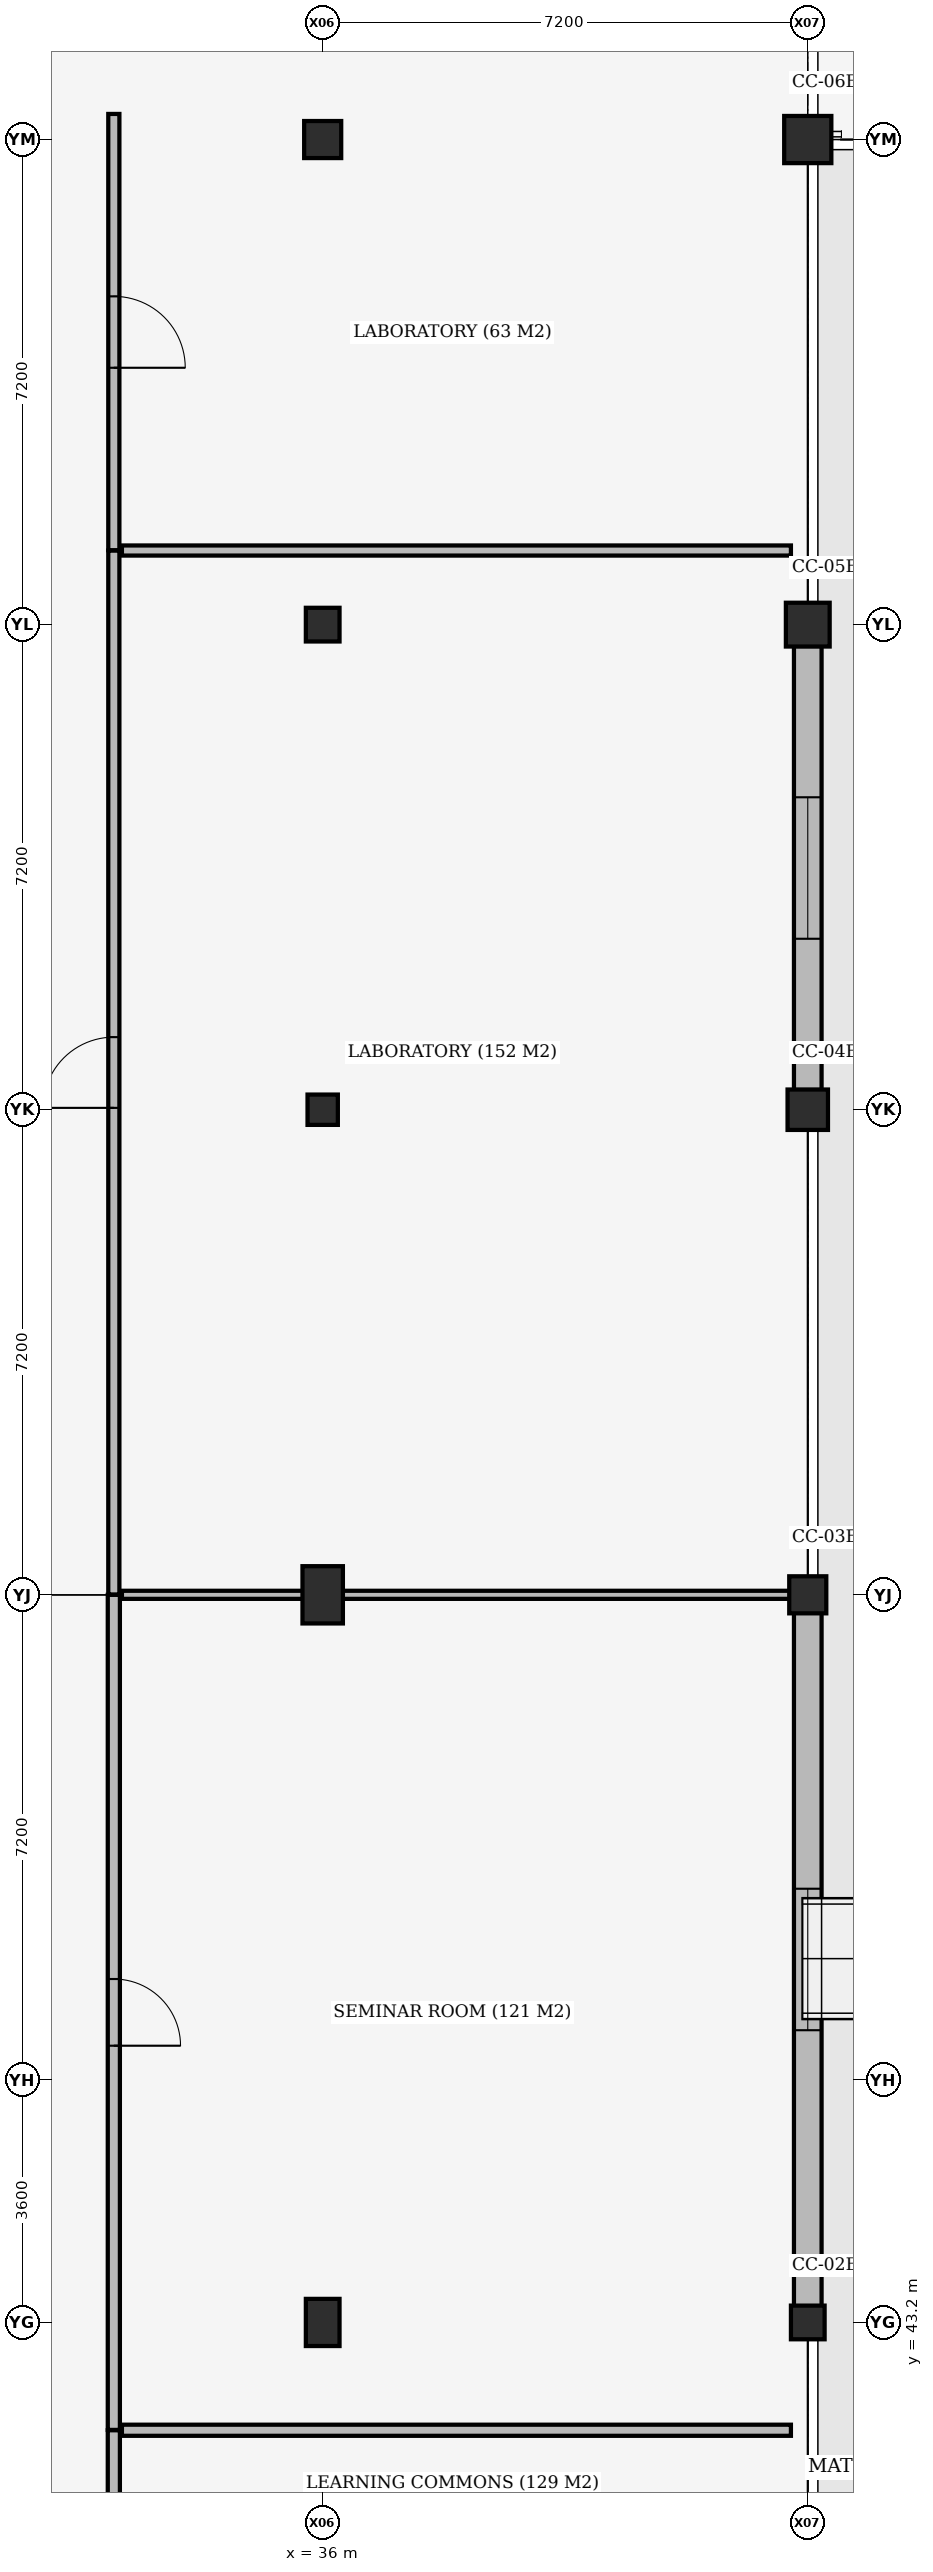
"""IFC4 building model, lengths in metres.
Left out: names, types, materials, properties, quantities, classifications, styles, units other than length and angle.
Written with IfcOpenShell. Run it as: python <this file> out.ifc"""

import sys

from ifc_helpers import new_model, si_unit, direction, frame, frame_2d, origin, origin_2d, place, context, subcontext, project, spatial, rectangle, extrude, element, fill, save


model = new_model("IFC4")
c1 = context("Model", 3, precision=1e-05, world=origin(), true_north=direction((0.0, 1.0)))
c2 = subcontext(c1, "Body", "Model", "MODEL_VIEW")
j1 = project(units=[si_unit("LENGTHUNIT", "METRE"), si_unit("PLANEANGLEUNIT", "RADIAN")], contexts=[c1])
p1 = place(None, origin())
s1 = spatial("IfcSite", under=j1, at=p1, CompositionType="ELEMENT")
p2 = place(p1, origin())
s2 = spatial("IfcBuilding", under=s1, at=p2, CompositionType="ELEMENT")
p3 = place(p2, origin())
s3 = spatial("IfcBuildingStorey", under=s2, at=p3, CompositionType="ELEMENT", Elevation=0.0)
p4 = place(p3, frame((36.0, 43.2, 0.0), z_axis=(0.0, 0.0, 1.0), x_axis=(1.0, 0.0, 0.0)))
e1 = element("IfcColumn", 1, at=p4, inside=s3, PredefinedType="COLUMN", context=c2, shape_type="SweptSolid", body=[
    extrude(rectangle(XDim=0.5, YDim=0.7, at=origin_2d()), origin(), (0.0, 0.0, 1.0), 5.1),
])
p5 = place(p3, frame((36.0, 54.0, 0.0), z_axis=(0.0, 0.0, 1.0), x_axis=(1.0, 0.0, 0.0)))
e2 = element("IfcColumn", 2, at=p5, inside=s3, PredefinedType="COLUMN", context=c2, shape_type="SweptSolid", body=[
    extrude(rectangle(XDim=0.6, YDim=0.85, at=origin_2d()), origin(), (0.0, 0.0, 1.0), 5.1),
])
p6 = place(p3, frame((36.0, 61.2, 0.0), z_axis=(0.0, 0.0, 1.0), x_axis=(1.0, 0.0, 0.0)))
e3 = element("IfcColumn", 3, at=p6, inside=s3, PredefinedType="COLUMN", context=c2, shape_type="SweptSolid", body=[
    extrude(rectangle(XDim=0.45, YDim=0.45, at=origin_2d()), origin(), (0.0, 0.0, 1.0), 5.1),
])
p7 = place(p3, frame((36.0, 68.4, 0.0), z_axis=(0.0, 0.0, 1.0), x_axis=(1.0, 0.0, 0.0)))
e4 = element("IfcColumn", 4, at=p7, inside=s3, PredefinedType="COLUMN", context=c2, shape_type="SweptSolid", body=[
    extrude(rectangle(XDim=0.5, YDim=0.5, at=origin_2d()), origin(), (0.0, 0.0, 1.0), 5.1),
])
p8 = place(p3, frame((36.0, 75.6, 0.0), z_axis=(0.0, 0.0, 1.0), x_axis=(1.0, 0.0, 0.0)))
e5 = element("IfcColumn", 5, at=p8, inside=s3, PredefinedType="COLUMN", context=c2, shape_type="SweptSolid", body=[
    extrude(rectangle(XDim=0.55, YDim=0.55, at=origin_2d()), origin(), (0.0, 0.0, 1.0), 5.1),
])
p9 = place(p3, frame((43.2, 43.2, 0.0), z_axis=(0.0, 0.0, 1.0), x_axis=(1.0, 0.0, 0.0)))
e6 = element("IfcColumn", 6, at=p9, inside=s3, PredefinedType="COLUMN", context=c2, shape_type="SweptSolid", body=[
    extrude(rectangle(XDim=0.5, YDim=0.5, at=origin_2d()), origin(), (0.0, 0.0, 1.0), 5.1),
])
p10 = place(p3, frame((43.2, 54.0, 0.0), z_axis=(0.0, 0.0, 1.0), x_axis=(1.0, 0.0, 0.0)))
e7 = element("IfcColumn", 7, at=p10, inside=s3, PredefinedType="COLUMN", context=c2, shape_type="SweptSolid", body=[
    extrude(rectangle(XDim=0.55, YDim=0.55, at=origin_2d()), origin(), (0.0, 0.0, 1.0), 5.1),
])
p11 = place(p3, frame((43.2, 61.2, 0.0), z_axis=(0.0, 0.0, 1.0), x_axis=(1.0, 0.0, 0.0)))
e8 = element("IfcColumn", 8, at=p11, inside=s3, PredefinedType="COLUMN", context=c2, shape_type="SweptSolid", body=[
    extrude(rectangle(XDim=0.6, YDim=0.6, at=origin_2d()), origin(), (0.0, 0.0, 1.0), 5.1),
])
p12 = place(p3, frame((43.2, 68.4, 0.0), z_axis=(0.0, 0.0, 1.0), x_axis=(1.0, 0.0, 0.0)))
e9 = element("IfcColumn", 9, at=p12, inside=s3, PredefinedType="COLUMN", context=c2, shape_type="SweptSolid", body=[
    extrude(rectangle(XDim=0.65, YDim=0.65, at=origin_2d()), origin(), (0.0, 0.0, 1.0), 5.1),
])
p13 = place(p3, frame((43.2, 75.6, 0.0), z_axis=(0.0, 0.0, 1.0), x_axis=(1.0, 0.0, 0.0)))
e10 = element("IfcColumn", 10, at=p13, inside=s3, PredefinedType="COLUMN", context=c2, shape_type="SweptSolid", body=[
    extrude(rectangle(XDim=0.7, YDim=0.7, at=origin_2d()), origin(), (0.0, 0.0, 1.0), 5.1),
])
p14 = place(p3, frame((43.2, 53.733, 0.0), z_axis=(0.0, 0.0, 1.0), x_axis=(0.0, -1.0, 0.0)))
e11 = element("IfcWall", 11, at=p14, inside=s3, PredefinedType="STANDARD", context=c2, shape_type="SweptSolid", body=[
    extrude(rectangle(XDim=10.291, YDim=0.41, at=frame_2d((5.146, 0.0))), origin(), (0.0, 0.0, 1.0), 4.45),
])
p15 = place(p14, frame((4.095, 0.0, 0.8)))
e12 = element("IfcOpeningElement", 12, at=p15, cuts=e11, PredefinedType="OPENING", context=c2, shape_type="SweptSolid", body=[
    extrude(rectangle(XDim=2.1, YDim=3.0, at=frame_2d((1.05, 1.5))), frame((0.0, 0.215, 0.0), z_axis=(0.0, -1.0, 0.0), x_axis=(1.0, 0.0, 0.0)), (0.0, 0.0, 1.0), 0.43),
])
p16 = place(p3, frame((43.2, 68.083, 0.0), z_axis=(0.0, 0.0, 1.0), x_axis=(0.0, -1.0, 0.0)))
e13 = element("IfcWall", 13, at=p16, inside=s3, PredefinedType="STANDARD", context=c2, shape_type="SweptSolid", body=[
    extrude(rectangle(XDim=6.591, YDim=0.41, at=frame_2d((3.295, 0.0))), origin(), (0.0, 0.0, 1.0), 4.35),
])
p17 = place(p16, frame((2.246, 0.0, 0.8)))
e14 = element("IfcOpeningElement", 14, at=p17, cuts=e13, PredefinedType="OPENING", context=c2, shape_type="SweptSolid", body=[
    extrude(rectangle(XDim=2.1, YDim=3.0, at=frame_2d((1.05, 1.5))), frame((0.0, 0.215, 0.0), z_axis=(0.0, -1.0, 0.0), x_axis=(1.0, 0.0, 0.0)), (0.0, 0.0, 1.0), 0.43),
])
p18 = place(p3, frame((32.9, 28.42, 0.0), z_axis=(0.0, 0.0, 1.0), x_axis=(0.0, 1.0, 0.0)))
e15 = element("IfcWall", 15, at=p18, inside=s3, PredefinedType="PARTITIONING", context=c2, shape_type="SweptSolid", body=[
    extrude(rectangle(XDim=13.18, YDim=0.18, at=frame_2d((6.59, 0.0))), origin(), (0.0, 0.0, 1.0), 4.45),
])
p19 = place(p18, frame((6.1, 0.0, 0.0)))
e16 = element("IfcOpeningElement", 16, at=p19, cuts=e15, PredefinedType="OPENING", context=c2, shape_type="SweptSolid", body=[
    extrude(rectangle(XDim=0.98, YDim=2.18, at=frame_2d((0.49, 1.09))), frame((0.0, 0.1, 0.0), z_axis=(0.0, -1.0, 0.0), x_axis=(1.0, 0.0, 0.0)), (0.0, 0.0, 1.0), 0.2),
])
p20 = place(p3, frame((33.02, 41.6, 0.0), z_axis=(0.0, 0.0, 1.0), x_axis=(1.0, 0.0, 0.0)))
e17 = element("IfcWall", 17, at=p20, inside=s3, PredefinedType="PARTITIONING", context=c2, shape_type="SweptSolid", body=[
    extrude(rectangle(XDim=9.93, YDim=0.165, at=frame_2d((4.965, 0.0))), origin(), (0.0, 0.0, 1.0), 4.35),
])
p21 = place(p3, frame((32.9, 41.605, 0.0), z_axis=(0.0, 0.0, 1.0), x_axis=(0.0, 1.0, 0.0)))
e18 = element("IfcWall", 18, at=p21, inside=s3, PredefinedType="PARTITIONING", context=c2, shape_type="SweptSolid", body=[
    extrude(rectangle(XDim=12.395, YDim=0.18, at=frame_2d((6.198, 0.0))), origin(), (0.0, 0.0, 1.0), 4.3),
])
p22 = place(p21, frame((5.702, 0.0, 0.0)))
e19 = element("IfcOpeningElement", 19, at=p22, cuts=e18, PredefinedType="OPENING", context=c2, shape_type="SweptSolid", body=[
    extrude(rectangle(XDim=0.99, YDim=2.18, at=frame_2d((0.495, 1.09))), frame((0.0, 0.1, 0.0), z_axis=(0.0, -1.0, 0.0), x_axis=(1.0, 0.0, 0.0)), (0.0, 0.0, 1.0), 0.2),
])
p23 = place(p3, frame((33.02, 54.0, 0.0), z_axis=(0.0, 0.0, 1.0), x_axis=(1.0, 0.0, 0.0)))
e20 = element("IfcWall", 20, at=p23, inside=s3, PredefinedType="PARTITIONING", context=c2, shape_type="SweptSolid", body=[
    extrude(rectangle(XDim=9.93, YDim=0.12, at=frame_2d((4.965, 0.0))), origin(), (0.0, 0.0, 1.0), 4.3),
])
p24 = place(p3, frame((32.9, 54.005, 0.0), z_axis=(0.0, 0.0, 1.0), x_axis=(0.0, 1.0, 0.0)))
e21 = element("IfcWall", 21, at=p24, inside=s3, PredefinedType="PARTITIONING", context=c2, shape_type="SweptSolid", body=[
    extrude(rectangle(XDim=15.495, YDim=0.165, at=frame_2d((7.748, 0.0))), origin(), (0.0, 0.0, 1.0), 4.3),
])
p25 = place(p24, frame((7.222, 0.0, 0.0)))
e22 = element("IfcOpeningElement", 22, at=p25, cuts=e21, PredefinedType="OPENING", context=c2, shape_type="SweptSolid", body=[
    extrude(rectangle(XDim=1.05, YDim=2.2, at=frame_2d((0.525, 1.1))), frame((0.0, 0.093, 0.0), z_axis=(0.0, -1.0, 0.0), x_axis=(1.0, 0.0, 0.0)), (0.0, 0.0, 1.0), 0.185),
])
p26 = place(p3, frame((33.02, 69.5, 0.0), z_axis=(0.0, 0.0, 1.0), x_axis=(1.0, 0.0, 0.0)))
e23 = element("IfcWall", 23, at=p26, inside=s3, PredefinedType="PARTITIONING", context=c2, shape_type="SweptSolid", body=[
    extrude(rectangle(XDim=9.93, YDim=0.15, at=frame_2d((4.965, 0.0))), origin(), (0.0, 0.0, 1.0), 4.4),
])
p27 = place(p3, frame((32.9, 69.505, 0.0), z_axis=(0.0, 0.0, 1.0), x_axis=(0.0, 1.0, 0.0)))
e24 = element("IfcWall", 24, at=p27, inside=s3, PredefinedType="PARTITIONING", context=c2, shape_type="SweptSolid", body=[
    extrude(rectangle(XDim=6.475, YDim=0.165, at=frame_2d((3.238, 0.0))), origin(), (0.0, 0.0, 1.0), 4.5),
])
p28 = place(p27, frame((2.708, 0.0, 0.0)))
e25 = element("IfcOpeningElement", 25, at=p28, cuts=e24, PredefinedType="OPENING", context=c2, shape_type="SweptSolid", body=[
    extrude(rectangle(XDim=1.06, YDim=2.2, at=frame_2d((0.53, 1.1))), frame((0.0, 0.093, 0.0), z_axis=(0.0, -1.0, 0.0), x_axis=(1.0, 0.0, 0.0)), (0.0, 0.0, 1.0), 0.185),
])
p29 = place(p15, origin())
e26 = element("IfcWindow", 26, at=p29, inside=s3, PartitioningType="DOUBLE_PANEL_VERTICAL", PredefinedType="WINDOW", context=c2, shape_type="SweptSolid", body=[
    extrude(rectangle(XDim=2.1, YDim=3.0, at=frame_2d((1.05, 1.5))), frame((0.0, 0.03, 0.0), z_axis=(0.0, -1.0, 0.0), x_axis=(1.0, 0.0, 0.0)), (0.0, 0.0, 1.0), 0.06),
])
fill(e12, e26)
p30 = place(p17, origin())
e27 = element("IfcWindow", 27, at=p30, inside=s3, PartitioningType="DOUBLE_PANEL_VERTICAL", PredefinedType="WINDOW", context=c2, shape_type="SweptSolid", body=[
    extrude(rectangle(XDim=2.1, YDim=3.0, at=frame_2d((1.05, 1.5))), frame((0.0, 0.03, 0.0), z_axis=(0.0, -1.0, 0.0), x_axis=(1.0, 0.0, 0.0)), (0.0, 0.0, 1.0), 0.06),
])
fill(e14, e27)
p31 = place(p22, origin())
e28 = element("IfcDoor", 28, at=p31, inside=s3, OperationType="SINGLE_SWING_RIGHT", PredefinedType="DOOR", context=c2, shape_type="SweptSolid", body=[
    extrude(rectangle(XDim=0.99, YDim=2.18, at=frame_2d((0.495, 1.09))), frame((0.0, 0.025, 0.0), z_axis=(0.0, -1.0, 0.0), x_axis=(1.0, 0.0, 0.0)), (0.0, 0.0, 1.0), 0.05),
])
fill(e19, e28)
p32 = place(p25, origin())
e29 = element("IfcDoor", 29, at=p32, inside=s3, OperationType="SINGLE_SWING_LEFT", PredefinedType="DOOR", context=c2, shape_type="SweptSolid", body=[
    extrude(rectangle(XDim=1.05, YDim=2.2, at=frame_2d((0.525, 1.1))), frame((0.0, 0.025, 0.0), z_axis=(0.0, -1.0, 0.0), x_axis=(1.0, 0.0, 0.0)), (0.0, 0.0, 1.0), 0.05),
])
fill(e22, e29)
p33 = place(p28, origin())
e30 = element("IfcDoor", 30, at=p33, inside=s3, OperationType="SINGLE_SWING_RIGHT", PredefinedType="DOOR", context=c2, shape_type="SweptSolid", body=[
    extrude(rectangle(XDim=1.06, YDim=2.2, at=frame_2d((0.53, 1.1))), frame((0.0, 0.025, 0.0), z_axis=(0.0, -1.0, 0.0), x_axis=(1.0, 0.0, 0.0)), (0.0, 0.0, 1.0), 0.05),
])
fill(e25, e30)
save(model, sys.argv[1])
